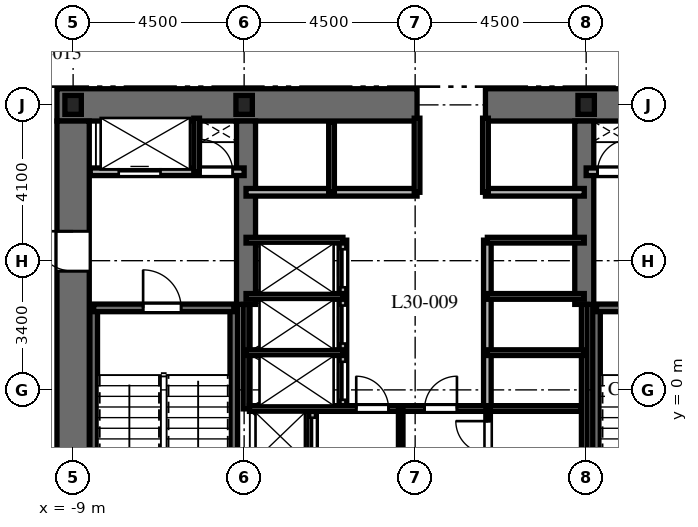
"""IFC4 building model, lengths in metres.
Left out: names, types, materials, properties, quantities, classifications, styles, units other than length and angle.
Written with IfcOpenShell. Run it as: python <this file> out.ifc"""

import sys

from ifc_helpers import new_model, si_unit, direction, frame, frame_2d, origin, origin_2d, place, context, subcontext, project, spatial, rectangle, i_section, extrude, element, fill, save


model = new_model("IFC4")
c1 = context("Model", 3, precision=1e-05, world=origin(), true_north=direction((0.0, 1.0)))
c2 = subcontext(c1, "Body", "Model", "MODEL_VIEW")
j1 = project(units=[si_unit("LENGTHUNIT", "METRE"), si_unit("PLANEANGLEUNIT", "RADIAN")], contexts=[c1])
p1 = place(None, origin())
s1 = spatial("IfcSite", under=j1, at=p1, CompositionType="ELEMENT")
p2 = place(p1, origin())
s2 = spatial("IfcBuilding", under=s1, at=p2, CompositionType="ELEMENT")
p3 = place(p2, frame((0.0, 0.0, 124.7)))
s3 = spatial("IfcBuildingStorey", under=s2, at=p3, CompositionType="ELEMENT", Elevation=124.7)
p4 = place(p3, frame((-9.425, 7.5, 0.0), z_axis=(0.0, 0.0, 1.0), x_axis=(1.0, 0.0, 0.0)))
e1 = element("IfcWall", 1, at=p4, inside=s3, PredefinedType="SHEAR", context=c2, shape_type="SweptSolid", body=[
    extrude(rectangle(XDim=9.475, YDim=0.85, at=frame_2d((4.738, 0.0))), origin(), (0.0, 0.0, 1.0), 3.7),
])
p5 = place(p3, frame((1.85, 7.5, 0.0), z_axis=(0.0, 0.0, 1.0), x_axis=(1.0, 0.0, 0.0)))
e2 = element("IfcWall", 2, at=p5, inside=s3, PredefinedType="SHEAR", context=c2, shape_type="SweptSolid", body=[
    extrude(rectangle(XDim=7.575, YDim=0.85, at=frame_2d((3.788, 0.0))), origin(), (0.0, 0.0, 1.0), 3.7),
])
p6 = place(p3, frame((-9.0, -7.075, 0.0), z_axis=(0.0, 0.0, 1.0), x_axis=(0.0, 1.0, 0.0)))
e3 = element("IfcWall", 3, at=p6, inside=s3, PredefinedType="SHEAR", context=c2, shape_type="SweptSolid", body=[
    extrude(rectangle(XDim=14.15, YDim=0.85, at=frame_2d((7.075, 0.0))), origin(), (0.0, 0.0, 1.0), 3.7),
])
p7 = place(p6, frame((10.2, 0.0, 0.0)))
e4 = element("IfcOpeningElement", 4, at=p7, cuts=e3, PredefinedType="OPENING", context=c2, shape_type="SweptSolid", body=[
    extrude(rectangle(XDim=1.05, YDim=2.15, at=frame_2d((0.525, 1.075))), frame((0.0, 0.435, 0.0), z_axis=(0.0, -1.0, 0.0), x_axis=(1.0, 0.0, 0.0)), (0.0, 0.0, 1.0), 0.87),
])
for number, where, z_axis, x_axis in (
    (5, (-4.45, 2.25, 0.0), (0.0, 0.0, 1.0), (0.0, 1.0, 0.0)),
    (6, (4.45, 2.25, 0.0), (0.0, 0.0, 1.0), (0.0, 1.0, 0.0)),
):
    element("IfcWall", number, at=place(p3, frame(where, z_axis=z_axis, x_axis=x_axis)), inside=s3, PredefinedType="SHEAR", context=c2, shape_type="SweptSolid", body=[
        extrude(rectangle(XDim=4.825, YDim=0.5, at=frame_2d((2.413, 0.0))), origin(), (0.0, 0.0, 1.0), 3.7),
    ])
for number, where, z_axis, x_axis in (
    (7, (-8.458, -6.985, 0.0), (0.0, 0.0, 1.0), (0.0, 1.0, 0.0)),
    (8, (-4.772, -6.985, 0.0), (0.0, 0.0, 1.0), (0.0, 1.0, 0.0)),
):
    element("IfcWall", number, at=place(p3, frame(where, z_axis=z_axis, x_axis=x_axis)), inside=s3, PredefinedType="SHEAR", context=c2, shape_type="SweptSolid", body=[
        extrude(rectangle(XDim=9.143, YDim=0.2, at=frame_2d((4.572, 0.0))), origin(), (0.0, 0.0, 1.0), 3.7),
    ])
p8 = place(p3, frame((-8.458, 2.158, 0.0), z_axis=(0.0, 0.0, 1.0), x_axis=(1.0, 0.0, 0.0)))
e9 = element("IfcWall", 9, at=p8, inside=s3, PredefinedType="SHEAR", context=c2, shape_type="SweptSolid", body=[
    extrude(rectangle(XDim=3.686, YDim=0.2, at=frame_2d((1.843, 0.0))), origin(), (0.0, 0.0, 1.0), 3.7),
])
p9 = place(p8, frame((1.3, 0.0, 0.0)))
e10 = element("IfcOpeningElement", 10, at=p9, cuts=e9, PredefinedType="OPENING", context=c2, shape_type="SweptSolid", body=[
    extrude(rectangle(XDim=1.0, YDim=2.15, at=frame_2d((0.5, 1.075))), frame((0.0, 0.11, 0.0), z_axis=(0.0, -1.0, 0.0), x_axis=(1.0, 0.0, 0.0)), (0.0, 0.0, 1.0), 0.22),
])
p10 = place(p3, frame((4.772, -6.985, 0.0), z_axis=(0.0, 0.0, 1.0), x_axis=(0.0, 1.0, 0.0)))
e11 = element("IfcWall", 11, at=p10, inside=s3, PredefinedType="SHEAR", context=c2, shape_type="SweptSolid", body=[
    extrude(rectangle(XDim=9.143, YDim=0.2, at=frame_2d((4.572, 0.0))), origin(), (0.0, 0.0, 1.0), 3.7),
])
p11 = place(p3, frame((4.772, 2.158, 0.0), z_axis=(0.0, 0.0, 1.0), x_axis=(1.0, 0.0, 0.0)))
e12 = element("IfcWall", 12, at=p11, inside=s3, PredefinedType="SHEAR", context=c2, shape_type="SweptSolid", body=[
    extrude(rectangle(XDim=3.686, YDim=0.2, at=frame_2d((1.843, 0.0))), origin(), (0.0, 0.0, 1.0), 3.7),
])
p12 = place(p11, frame((1.35, 0.0, 0.0)))
e13 = element("IfcOpeningElement", 13, at=p12, cuts=e12, PredefinedType="OPENING", context=c2, shape_type="SweptSolid", body=[
    extrude(rectangle(XDim=1.0, YDim=2.15, at=frame_2d((0.5, 1.075))), frame((0.0, 0.11, 0.0), z_axis=(0.0, -1.0, 0.0), x_axis=(1.0, 0.0, 0.0)), (0.0, 0.0, 1.0), 0.22),
])
for number, where, z_axis, x_axis in (
    (14, (4.5, 7.5, 0.0), (0.0, 0.0, 1.0), (1.0, 0.0, 0.0)),
    (15, (-4.5, 7.5, 0.0), (0.0, 0.0, 1.0), (1.0, 0.0, 0.0)),
    (16, (-9.0, 7.5, 0.0), (0.0, 0.0, 1.0), (1.0, 0.0, 0.0)),
):
    element("IfcColumn", number, at=place(p3, frame(where, z_axis=z_axis, x_axis=x_axis)), inside=s3, PredefinedType="COLUMN", context=c2, shape_type="SweptSolid", body=[
        extrude(i_section(OverallWidth=0.432, OverallDepth=0.498, WebThickness=0.056, FlangeThickness=0.089, at=origin_2d()), origin(), (0.0, 0.0, 1.0), 3.7),
    ])
p13 = place(p3, frame((-8.55, 5.74, 0.0), z_axis=(0.0, 0.0, 1.0), x_axis=(1.0, 0.0, 0.0)))
e17 = element("IfcWall", 17, at=p13, inside=s3, PredefinedType="PARTITIONING", context=c2, shape_type="SweptSolid", body=[
    extrude(rectangle(XDim=4.05, YDim=0.2, at=frame_2d((2.025, 0.0))), origin(), (0.0, 0.0, 1.0), 3.4),
])
p14 = place(p13, frame((0.75, 0.0, 0.0)))
e18 = element("IfcOpeningElement", 18, at=p14, cuts=e17, PredefinedType="OPENING", context=c2, shape_type="SweptSolid", body=[
    extrude(rectangle(XDim=1.1, YDim=2.2, at=frame_2d((0.55, 1.1))), frame((0.0, 0.11, 0.0), z_axis=(0.0, -1.0, 0.0), x_axis=(1.0, 0.0, 0.0)), (0.0, 0.0, 1.0), 0.22),
])
p15 = place(p13, frame((2.9, 0.0, 0.0)))
e19 = element("IfcOpeningElement", 19, at=p15, cuts=e17, PredefinedType="OPENING", context=c2, shape_type="SweptSolid", body=[
    extrude(rectangle(XDim=0.85, YDim=2.03, at=frame_2d((0.425, 1.015))), frame((0.0, 0.11, 0.0), z_axis=(0.0, -1.0, 0.0), x_axis=(1.0, 0.0, 0.0)), (0.0, 0.0, 1.0), 0.22),
])
p16 = place(p3, frame((-5.75, 5.74, 0.0), z_axis=(0.0, 0.0, 1.0), x_axis=(0.0, 1.0, 0.0)))
e20 = element("IfcWall", 20, at=p16, inside=s3, PredefinedType="PARTITIONING", context=c2, shape_type="SweptSolid", body=[
    extrude(rectangle(XDim=1.41, YDim=0.15, at=frame_2d((0.705, 0.0))), origin(), (0.0, 0.0, 1.0), 3.4),
])
p17 = place(p3, frame((4.5, 5.74, 0.0), z_axis=(0.0, 0.0, 1.0), x_axis=(1.0, 0.0, 0.0)))
e21 = element("IfcWall", 21, at=p17, inside=s3, PredefinedType="PARTITIONING", context=c2, shape_type="SweptSolid", body=[
    extrude(rectangle(XDim=4.05, YDim=0.2, at=frame_2d((2.025, 0.0))), origin(), (0.0, 0.0, 1.0), 3.4),
])
p18 = place(p17, frame((0.3, 0.0, 0.0)))
e22 = element("IfcOpeningElement", 22, at=p18, cuts=e21, PredefinedType="OPENING", context=c2, shape_type="SweptSolid", body=[
    extrude(rectangle(XDim=0.85, YDim=2.03, at=frame_2d((0.425, 1.015))), frame((0.0, 0.11, 0.0), z_axis=(0.0, -1.0, 0.0), x_axis=(1.0, 0.0, 0.0)), (0.0, 0.0, 1.0), 0.22),
])
p19 = place(p17, frame((2.15, 0.0, 0.0)))
e23 = element("IfcOpeningElement", 23, at=p19, cuts=e21, PredefinedType="OPENING", context=c2, shape_type="SweptSolid", body=[
    extrude(rectangle(XDim=1.1, YDim=2.2, at=frame_2d((0.55, 1.1))), frame((0.0, 0.11, 0.0), z_axis=(0.0, -1.0, 0.0), x_axis=(1.0, 0.0, 0.0)), (0.0, 0.0, 1.0), 0.22),
])
p20 = place(p3, frame((-2.7, -1.972, 0.0), z_axis=(0.0, 0.0, 1.0), x_axis=(0.0, 1.0, 0.0)))
e24 = element("IfcWall", 24, at=p20, inside=s3, PredefinedType="PARTITIONING", context=c2, shape_type="SweptSolid", body=[
    extrude(rectangle(XDim=1.472, YDim=0.2, at=frame_2d((0.736, 0.0))), origin(), (0.0, 0.0, 1.0), 3.4),
])
p21 = place(p20, frame((0.24, 0.0, 0.0)))
e25 = element("IfcOpeningElement", 25, at=p21, cuts=e24, PredefinedType="OPENING", context=c2, shape_type="SweptSolid", body=[
    extrude(rectangle(XDim=1.0, YDim=2.2, at=frame_2d((0.5, 1.1))), frame((0.0, 0.11, 0.0), z_axis=(0.0, -1.0, 0.0), x_axis=(1.0, 0.0, 0.0)), (0.0, 0.0, 1.0), 0.22),
])
p22 = place(p3, frame((-4.45, 5.2, 0.0), z_axis=(0.0, 0.0, 1.0), x_axis=(1.0, 0.0, 0.0)))
e26 = element("IfcWall", 26, at=p22, inside=s3, PredefinedType="PARTITIONING", context=c2, shape_type="SweptSolid", body=[
    extrude(rectangle(XDim=4.5, YDim=0.2, at=frame_2d((2.25, 0.0))), origin(), (0.0, 0.0, 1.0), 3.4),
])
p23 = place(p3, frame((1.85, 5.2, 0.0), z_axis=(0.0, 0.0, 1.0), x_axis=(1.0, 0.0, 0.0)))
e27 = element("IfcWall", 27, at=p23, inside=s3, PredefinedType="PARTITIONING", context=c2, shape_type="SweptSolid", body=[
    extrude(rectangle(XDim=2.6, YDim=0.2, at=frame_2d((1.3, 0.0))), origin(), (0.0, 0.0, 1.0), 3.4),
])
p24 = place(p3, frame((-2.2, 5.2, 0.0), z_axis=(0.0, 0.0, 1.0), x_axis=(0.0, 1.0, 0.0)))
e28 = element("IfcWall", 28, at=p24, inside=s3, PredefinedType="PARTITIONING", context=c2, shape_type="SweptSolid", body=[
    extrude(rectangle(XDim=1.85, YDim=0.15, at=frame_2d((0.925, 0.0))), origin(), (0.0, 0.0, 1.0), 3.4),
])
for number, where, z_axis, x_axis in (
    (29, (0.05, 5.2, 0.0), (0.0, 0.0, 1.0), (0.0, 1.0, 0.0)),
    (30, (1.85, 5.2, 0.0), (0.0, 0.0, 1.0), (0.0, 1.0, 0.0)),
):
    element("IfcWall", number, at=place(p3, frame(where, z_axis=z_axis, x_axis=x_axis)), inside=s3, PredefinedType="PARTITIONING", context=c2, shape_type="SweptSolid", body=[
        extrude(rectangle(XDim=1.95, YDim=0.15, at=frame_2d((0.975, 0.0))), origin(), (0.0, 0.0, 1.0), 3.4),
    ])
p25 = place(p3, frame((-4.45, -0.5, 0.0), z_axis=(0.0, 0.0, 1.0), x_axis=(0.0, 1.0, 0.0)))
e31 = element("IfcWall", 31, at=p25, inside=s3, PredefinedType="PARTITIONING", context=c2, shape_type="SweptSolid", body=[
    extrude(rectangle(XDim=2.75, YDim=0.15, at=frame_2d((1.375, 0.0))), origin(), (0.0, 0.0, 1.0), 3.4),
])
p26 = place(p3, frame((4.45, -1.972, 0.0), z_axis=(0.0, 0.0, 1.0), x_axis=(0.0, 1.0, 0.0)))
e32 = element("IfcWall", 32, at=p26, inside=s3, PredefinedType="PARTITIONING", context=c2, shape_type="SweptSolid", body=[
    extrude(rectangle(XDim=4.222, YDim=0.15, at=frame_2d((2.111, 0.0))), origin(), (0.0, 0.0, 1.0), 3.4),
])
p27 = place(p3, frame((-1.9, -0.5, 0.0), z_axis=(0.0, 0.0, 1.0), x_axis=(0.0, 1.0, 0.0)))
e33 = element("IfcWall", 33, at=p27, inside=s3, PredefinedType="PARTITIONING", context=c2, shape_type="SweptSolid", body=[
    extrude(rectangle(XDim=4.44, YDim=0.2, at=frame_2d((2.22, 0.0))), origin(), (0.0, 0.0, 1.0), 3.4),
])
p28 = place(p27, frame((0.24, 0.0, 0.0)))
e34 = element("IfcOpeningElement", 34, at=p28, cuts=e33, PredefinedType="OPENING", context=c2, shape_type="SweptSolid", body=[
    extrude(rectangle(XDim=1.0, YDim=2.2, at=frame_2d((0.5, 1.1))), frame((0.0, 0.11, 0.0), z_axis=(0.0, -1.0, 0.0), x_axis=(1.0, 0.0, 0.0)), (0.0, 0.0, 1.0), 0.22),
])
p29 = place(p27, frame((1.72, 0.0, 0.0)))
e35 = element("IfcOpeningElement", 35, at=p29, cuts=e33, PredefinedType="OPENING", context=c2, shape_type="SweptSolid", body=[
    extrude(rectangle(XDim=1.0, YDim=2.2, at=frame_2d((0.5, 1.1))), frame((0.0, 0.11, 0.0), z_axis=(0.0, -1.0, 0.0), x_axis=(1.0, 0.0, 0.0)), (0.0, 0.0, 1.0), 0.22),
])
p30 = place(p27, frame((3.2, 0.0, 0.0)))
e36 = element("IfcOpeningElement", 36, at=p30, cuts=e33, PredefinedType="OPENING", context=c2, shape_type="SweptSolid", body=[
    extrude(rectangle(XDim=1.0, YDim=2.2, at=frame_2d((0.5, 1.1))), frame((0.0, 0.11, 0.0), z_axis=(0.0, -1.0, 0.0), x_axis=(1.0, 0.0, 0.0)), (0.0, 0.0, 1.0), 0.22),
])
for number, where, z_axis, x_axis in (
    (37, (-4.45, 3.94, 0.0), (0.0, 0.0, 1.0), (1.0, 0.0, 0.0)),
    (38, (-4.45, 0.98, 0.0), (0.0, 0.0, 1.0), (1.0, 0.0, 0.0)),
    (39, (-4.45, 2.46, 0.0), (0.0, 0.0, 1.0), (1.0, 0.0, 0.0)),
):
    element("IfcWall", number, at=place(p3, frame(where, z_axis=z_axis, x_axis=x_axis)), inside=s3, PredefinedType="PARTITIONING", context=c2, shape_type="SweptSolid", body=[
        extrude(rectangle(XDim=2.55, YDim=0.15, at=frame_2d((1.275, 0.0))), origin(), (0.0, 0.0, 1.0), 3.4),
    ])
p31 = place(p3, frame((1.9, -0.5, 0.0), z_axis=(0.0, 0.0, 1.0), x_axis=(0.0, 1.0, 0.0)))
e40 = element("IfcWall", 40, at=p31, inside=s3, PredefinedType="PARTITIONING", context=c2, shape_type="SweptSolid", body=[
    extrude(rectangle(XDim=4.44, YDim=0.2, at=frame_2d((2.22, 0.0))), origin(), (0.0, 0.0, 1.0), 3.4),
])
for number, where, z_axis, x_axis in (
    (41, (1.9, 3.94, 0.0), (0.0, 0.0, 1.0), (1.0, 0.0, 0.0)),
    (42, (1.9, 0.98, 0.0), (0.0, 0.0, 1.0), (1.0, 0.0, 0.0)),
    (43, (1.9, 2.46, 0.0), (0.0, 0.0, 1.0), (1.0, 0.0, 0.0)),
):
    element("IfcWall", number, at=place(p3, frame(where, z_axis=z_axis, x_axis=x_axis)), inside=s3, PredefinedType="PARTITIONING", context=c2, shape_type="SweptSolid", body=[
        extrude(rectangle(XDim=2.55, YDim=0.15, at=frame_2d((1.275, 0.0))), origin(), (0.0, 0.0, 1.0), 3.4),
    ])
p32 = place(p3, frame((-4.36, -0.49, 0.0), z_axis=(0.0, 0.0, 1.0), x_axis=(1.0, 0.0, 0.0)))
e44 = element("IfcWall", 44, at=p32, inside=s3, PredefinedType="PARTITIONING", context=c2, shape_type="SweptSolid", body=[
    extrude(rectangle(XDim=8.72, YDim=0.15, at=frame_2d((4.36, 0.0))), origin(), (0.0, 0.0, 1.0), 3.4),
])
p33 = place(p32, frame((2.81, 0.0, 0.0)))
e45 = element("IfcOpeningElement", 45, at=p33, cuts=e44, PredefinedType="OPENING", context=c2, shape_type="SweptSolid", body=[
    extrude(rectangle(XDim=0.85, YDim=2.03, at=frame_2d((0.425, 1.015))), frame((0.0, 0.085, 0.0), z_axis=(0.0, -1.0, 0.0), x_axis=(1.0, 0.0, 0.0)), (0.0, 0.0, 1.0), 0.17),
])
p34 = place(p32, frame((4.61, 0.0, 0.0)))
e46 = element("IfcOpeningElement", 46, at=p34, cuts=e44, PredefinedType="OPENING", context=c2, shape_type="SweptSolid", body=[
    extrude(rectangle(XDim=0.85, YDim=2.03, at=frame_2d((0.425, 1.015))), frame((0.0, 0.085, 0.0), z_axis=(0.0, -1.0, 0.0), x_axis=(1.0, 0.0, 0.0)), (0.0, 0.0, 1.0), 0.17),
])
p35 = place(p3, frame((-0.38, -1.972, 0.0), z_axis=(0.0, 0.0, 1.0), x_axis=(0.0, 1.0, 0.0)))
e47 = element("IfcWall", 47, at=p35, inside=s3, PredefinedType="PARTITIONING", context=c2, shape_type="SweptSolid", body=[
    extrude(rectangle(XDim=1.472, YDim=0.12, at=frame_2d((0.736, 0.0))), origin(), (0.0, 0.0, 1.0), 3.4),
])
p36 = place(p3, frame((1.92, -1.972, 0.0), z_axis=(0.0, 0.0, 1.0), x_axis=(0.0, 1.0, 0.0)))
e48 = element("IfcWall", 48, at=p36, inside=s3, PredefinedType="PARTITIONING", context=c2, shape_type="SweptSolid", body=[
    extrude(rectangle(XDim=1.472, YDim=0.12, at=frame_2d((0.736, 0.0))), origin(), (0.0, 0.0, 1.0), 3.4),
])
p37 = place(p36, frame((0.3, 0.0, 0.0)))
e49 = element("IfcOpeningElement", 49, at=p37, cuts=e48, PredefinedType="OPENING", context=c2, shape_type="SweptSolid", body=[
    extrude(rectangle(XDim=0.85, YDim=2.03, at=frame_2d((0.425, 1.015))), frame((0.0, 0.07, 0.0), z_axis=(0.0, -1.0, 0.0), x_axis=(1.0, 0.0, 0.0)), (0.0, 0.0, 1.0), 0.14),
])
p38 = place(p9, origin())
e50 = element("IfcDoor", 50, at=p38, inside=s3, OperationType="SINGLE_SWING_LEFT", PredefinedType="DOOR", context=c2, shape_type="SweptSolid", body=[
    extrude(rectangle(XDim=1.0, YDim=2.15, at=frame_2d((0.5, 1.075))), frame((0.0, 0.025, 0.0), z_axis=(0.0, -1.0, 0.0), x_axis=(1.0, 0.0, 0.0)), (0.0, 0.0, 1.0), 0.05),
])
fill(e10, e50)
p39 = place(p7, origin())
e51 = element("IfcDoor", 51, at=p39, inside=s3, OperationType="SINGLE_SWING_RIGHT", PredefinedType="DOOR", context=c2, shape_type="SweptSolid", body=[
    extrude(rectangle(XDim=1.05, YDim=2.15, at=frame_2d((0.525, 1.075))), frame((0.0, 0.025, 0.0), z_axis=(0.0, -1.0, 0.0), x_axis=(1.0, 0.0, 0.0)), (0.0, 0.0, 1.0), 0.05),
])
fill(e4, e51)
p40 = place(p14, origin())
e52 = element("IfcDoor", 52, at=p40, inside=s3, OperationType="SLIDING_TO_LEFT", PredefinedType="DOOR", context=c2, shape_type="SweptSolid", body=[
    extrude(rectangle(XDim=1.1, YDim=2.2, at=frame_2d((0.55, 1.1))), frame((0.0, 0.025, 0.0), z_axis=(0.0, -1.0, 0.0), x_axis=(1.0, 0.0, 0.0)), (0.0, 0.0, 1.0), 0.05),
])
fill(e18, e52)
p41 = place(p15, origin())
e53 = element("IfcDoor", 53, at=p41, inside=s3, OperationType="SINGLE_SWING_LEFT", PredefinedType="DOOR", context=c2, shape_type="SweptSolid", body=[
    extrude(rectangle(XDim=0.85, YDim=2.03, at=frame_2d((0.425, 1.015))), frame((0.0, 0.025, 0.0), z_axis=(0.0, -1.0, 0.0), x_axis=(1.0, 0.0, 0.0)), (0.0, 0.0, 1.0), 0.05),
])
fill(e19, e53)
p42 = place(p18, origin())
e54 = element("IfcDoor", 54, at=p42, inside=s3, OperationType="SINGLE_SWING_RIGHT", PredefinedType="DOOR", context=c2, shape_type="SweptSolid", body=[
    extrude(rectangle(XDim=0.85, YDim=2.03, at=frame_2d((0.425, 1.015))), frame((0.0, 0.025, 0.0), z_axis=(0.0, -1.0, 0.0), x_axis=(1.0, 0.0, 0.0)), (0.0, 0.0, 1.0), 0.05),
])
fill(e22, e54)
p43 = place(p21, origin())
e55 = element("IfcDoor", 55, at=p43, inside=s3, OperationType="SLIDING_TO_LEFT", PredefinedType="DOOR", context=c2, shape_type="SweptSolid", body=[
    extrude(rectangle(XDim=1.0, YDim=2.2, at=frame_2d((0.5, 1.1))), frame((0.0, 0.025, 0.0), z_axis=(0.0, -1.0, 0.0), x_axis=(1.0, 0.0, 0.0)), (0.0, 0.0, 1.0), 0.05),
])
fill(e25, e55)
p44 = place(p28, origin())
e56 = element("IfcDoor", 56, at=p44, inside=s3, OperationType="SLIDING_TO_LEFT", PredefinedType="DOOR", context=c2, shape_type="SweptSolid", body=[
    extrude(rectangle(XDim=1.0, YDim=2.2, at=frame_2d((0.5, 1.1))), frame((0.0, 0.025, 0.0), z_axis=(0.0, -1.0, 0.0), x_axis=(1.0, 0.0, 0.0)), (0.0, 0.0, 1.0), 0.05),
])
fill(e34, e56)
p45 = place(p29, origin())
e57 = element("IfcDoor", 57, at=p45, inside=s3, OperationType="SLIDING_TO_LEFT", PredefinedType="DOOR", context=c2, shape_type="SweptSolid", body=[
    extrude(rectangle(XDim=1.0, YDim=2.2, at=frame_2d((0.5, 1.1))), frame((0.0, 0.025, 0.0), z_axis=(0.0, -1.0, 0.0), x_axis=(1.0, 0.0, 0.0)), (0.0, 0.0, 1.0), 0.05),
])
fill(e35, e57)
p46 = place(p30, origin())
e58 = element("IfcDoor", 58, at=p46, inside=s3, OperationType="SLIDING_TO_LEFT", PredefinedType="DOOR", context=c2, shape_type="SweptSolid", body=[
    extrude(rectangle(XDim=1.0, YDim=2.2, at=frame_2d((0.5, 1.1))), frame((0.0, 0.025, 0.0), z_axis=(0.0, -1.0, 0.0), x_axis=(1.0, 0.0, 0.0)), (0.0, 0.0, 1.0), 0.05),
])
fill(e36, e58)
p47 = place(p33, origin())
e59 = element("IfcDoor", 59, at=p47, inside=s3, OperationType="SINGLE_SWING_LEFT", PredefinedType="DOOR", context=c2, shape_type="SweptSolid", body=[
    extrude(rectangle(XDim=0.85, YDim=2.03, at=frame_2d((0.425, 1.015))), frame((0.0, 0.025, 0.0), z_axis=(0.0, -1.0, 0.0), x_axis=(1.0, 0.0, 0.0)), (0.0, 0.0, 1.0), 0.05),
])
fill(e45, e59)
p48 = place(p34, origin())
e60 = element("IfcDoor", 60, at=p48, inside=s3, OperationType="SINGLE_SWING_RIGHT", PredefinedType="DOOR", context=c2, shape_type="SweptSolid", body=[
    extrude(rectangle(XDim=0.85, YDim=2.03, at=frame_2d((0.425, 1.015))), frame((0.0, 0.025, 0.0), z_axis=(0.0, -1.0, 0.0), x_axis=(1.0, 0.0, 0.0)), (0.0, 0.0, 1.0), 0.05),
])
fill(e46, e60)
p49 = place(p37, origin())
e61 = element("IfcDoor", 61, at=p49, inside=s3, OperationType="SINGLE_SWING_RIGHT", PredefinedType="DOOR", context=c2, shape_type="SweptSolid", body=[
    extrude(rectangle(XDim=0.85, YDim=2.03, at=frame_2d((0.425, 1.015))), frame((0.0, 0.025, 0.0), z_axis=(0.0, -1.0, 0.0), x_axis=(1.0, 0.0, 0.0)), (0.0, 0.0, 1.0), 0.05),
])
fill(e49, e61)
save(model, sys.argv[1])
